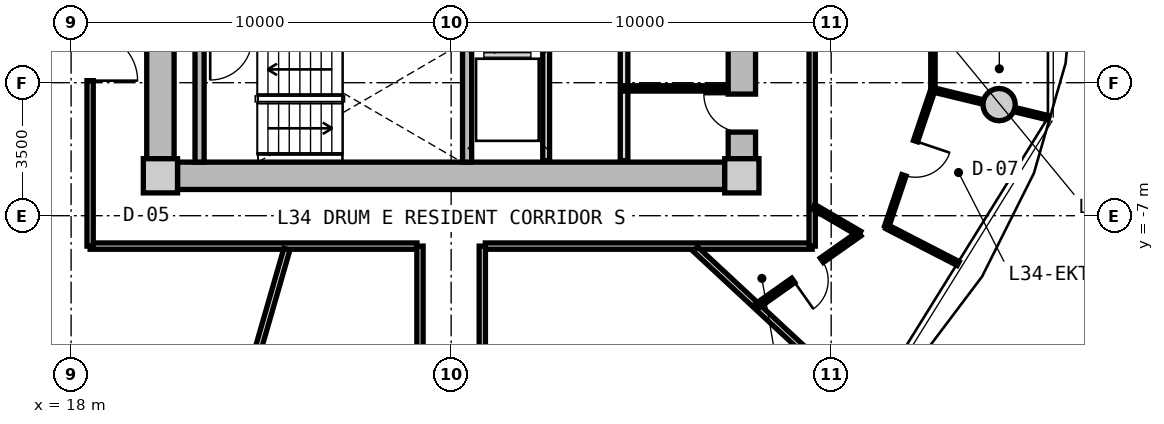
"""IFC4 building model, lengths in metres.
Left out: names, types, materials, properties, quantities, classifications, styles, units other than length and angle.
Written with IfcOpenShell. Run it as: python <this file> out.ifc"""

import sys

from ifc_helpers import new_model, si_unit, direction, frame, frame_2d, origin, origin_2d, place, context, subcontext, project, spatial, rectangle, circle, extrude, source, transform, mapped, element, fill, save


model = new_model("IFC4")
c1 = context("Model", 3, precision=1e-05, world=origin(), true_north=direction((0.0, 1.0)))
c2 = subcontext(c1, "Body", "Model", "MODEL_VIEW")
j1 = project(units=[si_unit("LENGTHUNIT", "METRE"), si_unit("PLANEANGLEUNIT", "RADIAN")], contexts=[c1])
p1 = place(None, origin())
s1 = spatial("IfcSite", under=j1, at=p1, CompositionType="ELEMENT")
p2 = place(p1, origin())
s2 = spatial("IfcBuilding", under=s1, at=p2, CompositionType="ELEMENT")
p3 = place(p2, frame((0.0, 0.0, 111.5)))
s3 = spatial("IfcBuildingStorey", under=s2, at=p3, CompositionType="ELEMENT", Elevation=111.5)
m1 = source(origin(), c2, "Body", "SweptSolid", [
    extrude(rectangle(XDim=0.9, YDim=0.9, at=origin_2d()), origin(), (0.0, 0.0, 1.0), 3.05),
])
for number, where, z_axis, x_axis in (
    (1, (20.35, -5.95, 0.0), (0.0, 0.0, 1.0), (1.0, 0.0, 0.0)),
    (2, (35.65, -5.95, 0.0), (0.0, 0.0, 1.0), (1.0, 0.0, 0.0)),
):
    element("IfcColumn", number, at=place(p3, frame(where, z_axis=z_axis, x_axis=x_axis)), inside=s3, PredefinedType="COLUMN", context=c2, shape_type="MappedRepresentation", body=[
        mapped(m1, transform((0.0, 0.0, 0.0), x_axis=(1.0, 0.0, 0.0), y_axis=(0.0, 1.0, 0.0), z_axis=(0.0, 0.0, 1.0), scale=1.0)),
    ])
m2 = source(origin(), c2, "Body", "SweptSolid", [
    extrude(rectangle(XDim=14.4, YDim=0.72, at=frame_2d((7.2, 0.0))), origin(), (0.0, 0.0, 1.0), 2.79),
])
p4 = place(p3, frame((35.2, -5.95, 0.0), z_axis=(0.0, 0.0, 1.0), x_axis=(-1.0, 0.0, 0.0)))
e3 = element("IfcWall", 3, at=p4, inside=s3, PredefinedType="SHEAR", context=c2, shape_type="MappedRepresentation", body=[
    mapped(m2, transform((0.0, 0.0, 0.0), x_axis=(1.0, 0.0, 0.0), y_axis=(0.0, 1.0, 0.0), z_axis=(0.0, 0.0, 1.0), scale=1.0)),
])
m3 = source(origin(), c2, "Body", "SweptSolid", [
    extrude(rectangle(XDim=11.0, YDim=0.72, at=frame_2d((5.5, 0.0))), origin(), (0.0, 0.0, 1.0), 2.79),
])
p5 = place(p3, frame((20.35, -5.5, 0.0), z_axis=(0.0, 0.0, 1.0), x_axis=(0.0, 1.0, 0.0)))
e4 = element("IfcWall", 4, at=p5, inside=s3, PredefinedType="SHEAR", context=c2, shape_type="MappedRepresentation", body=[
    mapped(m3, transform((0.0, 0.0, 0.0), x_axis=(1.0, 0.0, 0.0), y_axis=(0.0, 1.0, 0.0), z_axis=(0.0, 0.0, 1.0), scale=1.0)),
])
p6 = place(p5, frame((3.8, 0.0, 0.0)))
e5 = element("IfcOpeningElement", 5, at=p6, cuts=e4, PredefinedType="OPENING", context=c2, shape_type="SweptSolid", body=[
    extrude(rectangle(XDim=1.2, YDim=2.15, at=frame_2d((0.6, 1.075))), frame((0.0, 0.37, 0.0), z_axis=(0.0, -1.0, 0.0), x_axis=(1.0, 0.0, 0.0)), (0.0, 0.0, 1.0), 0.74),
])
p7 = place(p3, frame((35.65, 5.5, 0.0), z_axis=(0.0, 0.0, 1.0), x_axis=(0.0, -1.0, 0.0)))
e6 = element("IfcWall", 6, at=p7, inside=s3, PredefinedType="SHEAR", context=c2, shape_type="MappedRepresentation", body=[
    mapped(m3, transform((0.0, 0.0, 0.0), x_axis=(1.0, 0.0, 0.0), y_axis=(0.0, 1.0, 0.0), z_axis=(0.0, 0.0, 1.0), scale=1.0)),
])
p8 = place(p7, frame((5.65, 0.0, 0.0)))
e7 = element("IfcOpeningElement", 7, at=p8, cuts=e6, PredefinedType="OPENING", context=c2, shape_type="SweptSolid", body=[
    extrude(rectangle(XDim=1.2, YDim=2.15, at=frame_2d((0.6, 1.075))), frame((0.0, 0.37, 0.0), z_axis=(0.0, -1.0, 0.0), x_axis=(1.0, 0.0, 0.0)), (0.0, 0.0, 1.0), 0.74),
])
p9 = place(p7, frame((9.3, 0.0, 0.0)))
e8 = element("IfcOpeningElement", 8, at=p9, cuts=e6, PredefinedType="OPENING", context=c2, shape_type="SweptSolid", body=[
    extrude(rectangle(XDim=1.0, YDim=2.1, at=frame_2d((0.5, 1.05))), frame((0.0, 0.37, 0.0), z_axis=(0.0, -1.0, 0.0), x_axis=(1.0, 0.0, 0.0)), (0.0, 0.0, 1.0), 0.74),
])
m4 = source(origin(), c2, "Body", "SweptSolid", [
    extrude(circle(Radius=0.425, at=origin_2d()), origin(), (0.0, 0.0, 1.0), 3.05),
])
p10 = place(p3, frame((42.419, -4.076, 0.0), z_axis=(0.0, 0.0, 1.0), x_axis=(1.0, 0.0, 0.0)))
e9 = element("IfcColumn", 9, at=p10, inside=s3, PredefinedType="COLUMN", context=c2, shape_type="MappedRepresentation", body=[
    mapped(m4, transform((0.0, 0.0, 0.0), x_axis=(1.0, 0.0, 0.0), y_axis=(0.0, 1.0, 0.0), z_axis=(0.0, 0.0, 1.0), scale=1.0)),
])
m5 = source(origin(), c2, "Body", "SweptSolid", [
    extrude(rectangle(XDim=3.14, YDim=0.24, at=frame_2d((1.57, 0.0))), origin(), (0.0, 0.0, 1.0), 2.79),
])
for number, where, z_axis, x_axis in (
    (10, (21.38, -5.59, 0.0), (0.0, 0.0, 1.0), (0.0, 1.0, 0.0)),
    (11, (28.42, -5.59, 0.0), (0.0, 0.0, 1.0), (0.0, 1.0, 0.0)),
):
    element("IfcWall", number, at=place(p3, frame(where, z_axis=z_axis, x_axis=x_axis)), inside=s3, PredefinedType="PARTITIONING", context=c2, shape_type="MappedRepresentation", body=[
        mapped(m5, transform((0.0, 0.0, 0.0), x_axis=(1.0, 0.0, 0.0), y_axis=(0.0, 1.0, 0.0), z_axis=(0.0, 0.0, 1.0), scale=1.0)),
    ])
m6 = source(origin(), c2, "Body", "SweptSolid", [
    extrude(rectangle(XDim=3.8, YDim=0.2, at=frame_2d((1.9, 0.0))), origin(), (0.0, 0.0, 1.0), 2.775),
])
p11 = place(p3, frame((32.55, -5.55, 0.0), z_axis=(0.0, 0.0, 1.0), x_axis=(0.0, 1.0, 0.0)))
e12 = element("IfcWall", 12, at=p11, inside=s3, PredefinedType="PARTITIONING", context=c2, shape_type="MappedRepresentation", body=[
    mapped(m6, transform((0.0, 0.0, 0.0), x_axis=(1.0, 0.0, 0.0), y_axis=(0.0, 1.0, 0.0), z_axis=(0.0, 0.0, 1.0), scale=1.0)),
])
m7 = source(origin(), c2, "Body", "SweptSolid", [
    extrude(rectangle(XDim=3.22, YDim=0.18, at=frame_2d((1.61, 0.0))), origin(), (0.0, 0.0, 1.0), 2.775),
])
p12 = place(p3, frame((30.5, -5.55, 0.0), z_axis=(0.0, 0.0, 1.0), x_axis=(0.0, 1.0, 0.0)))
e13 = element("IfcWall", 13, at=p12, inside=s3, PredefinedType="PARTITIONING", context=c2, shape_type="MappedRepresentation", body=[
    mapped(m7, transform((0.0, 0.0, 0.0), x_axis=(1.0, 0.0, 0.0), y_axis=(0.0, 1.0, 0.0), z_axis=(0.0, 0.0, 1.0), scale=1.0)),
])
m8 = source(origin(), c2, "Body", "SweptSolid", [
    extrude(rectangle(XDim=2.7, YDim=0.14, at=frame_2d((1.35, 0.0))), origin(), (0.0, 0.0, 1.0), 2.775),
])
p13 = place(p3, frame((32.55, -3.65, 0.0), z_axis=(0.0, 0.0, 1.0), x_axis=(1.0, 0.0, 0.0)))
e14 = element("IfcWall", 14, at=p13, inside=s3, PredefinedType="PARTITIONING", context=c2, shape_type="MappedRepresentation", body=[
    mapped(m8, transform((0.0, 0.0, 0.0), x_axis=(1.0, 0.0, 0.0), y_axis=(0.0, 1.0, 0.0), z_axis=(0.0, 0.0, 1.0), scale=1.0)),
])
m9 = source(origin(), c2, "Body", "SweptSolid", [
    extrude(rectangle(XDim=8.6, YDim=0.165, at=frame_2d((4.3, 0.0))), origin(), (0.0, 0.0, 1.0), 2.775),
])
for number, where, z_axis, x_axis in (
    (15, (37.5, -7.8, 0.0), (0.0, 0.0, 1.0), (-1.0, 0.0, 0.0)),
    (16, (27.1, -7.8, 0.0), (0.0, 0.0, 1.0), (-1.0, 0.0, 0.0)),
):
    element("IfcWall", number, at=place(p3, frame(where, z_axis=z_axis, x_axis=x_axis)), inside=s3, PredefinedType="PARTITIONING", context=c2, shape_type="MappedRepresentation", body=[
        mapped(m9, transform((0.0, 0.0, 0.0), x_axis=(1.0, 0.0, 0.0), y_axis=(0.0, 1.0, 0.0), z_axis=(0.0, 0.0, 1.0), scale=1.0)),
    ])
m10 = source(origin(), c2, "Body", "SweptSolid", [
    extrude(rectangle(XDim=15.6, YDim=0.165, at=frame_2d((7.8, 0.0))), origin(), (0.0, 0.0, 1.0), 2.775),
])
p14 = place(p3, frame((18.5, -7.8, 0.0), z_axis=(0.0, 0.0, 1.0), x_axis=(0.0, 1.0, 0.0)))
e17 = element("IfcWall", 17, at=p14, inside=s3, PredefinedType="PARTITIONING", context=c2, shape_type="MappedRepresentation", body=[
    mapped(m10, transform((0.0, 0.0, 0.0), x_axis=(1.0, 0.0, 0.0), y_axis=(0.0, 1.0, 0.0), z_axis=(0.0, 0.0, 1.0), scale=1.0)),
])
p15 = place(p14, frame((10.383, 0.0, 0.0)))
e18 = element("IfcOpeningElement", 18, at=p15, cuts=e17, PredefinedType="OPENING", context=c2, shape_type="SweptSolid", body=[
    extrude(rectangle(XDim=1.05, YDim=2.15, at=frame_2d((0.525, 1.075))), frame((0.0, 0.093, 0.0), z_axis=(0.0, -1.0, 0.0), x_axis=(1.0, 0.0, 0.0)), (0.0, 0.0, 1.0), 0.185),
])
p16 = place(p14, frame((4.353, 0.0, 0.0)))
e19 = element("IfcOpeningElement", 19, at=p16, cuts=e17, PredefinedType="OPENING", context=c2, shape_type="SweptSolid", body=[
    extrude(rectangle(XDim=1.25, YDim=2.2, at=frame_2d((0.625, 1.1))), frame((0.0, 0.093, 0.0), z_axis=(0.0, -1.0, 0.0), x_axis=(1.0, 0.0, 0.0)), (0.0, 0.0, 1.0), 0.185),
])
p17 = place(p3, frame((37.5, 7.8, 0.0), z_axis=(0.0, 0.0, 1.0), x_axis=(0.0, -1.0, 0.0)))
e20 = element("IfcWall", 20, at=p17, inside=s3, PredefinedType="PARTITIONING", context=c2, shape_type="MappedRepresentation", body=[
    mapped(m10, transform((0.0, 0.0, 0.0), x_axis=(1.0, 0.0, 0.0), y_axis=(0.0, 1.0, 0.0), z_axis=(0.0, 0.0, 1.0), scale=1.0)),
])
p18 = place(p17, frame((6.87, 0.0, 0.0)))
e21 = element("IfcOpeningElement", 21, at=p18, cuts=e20, PredefinedType="OPENING", context=c2, shape_type="SweptSolid", body=[
    extrude(rectangle(XDim=1.05, YDim=2.15, at=frame_2d((0.525, 1.075))), frame((0.0, 0.093, 0.0), z_axis=(0.0, -1.0, 0.0), x_axis=(1.0, 0.0, 0.0)), (0.0, 0.0, 1.0), 0.185),
])
m11 = source(origin(), c2, "Body", "SweptSolid", [
    extrude(rectangle(XDim=8.989, YDim=0.165, at=frame_2d((4.495, 0.0))), origin(), (0.0, 0.0, 1.0), 2.275),
])
p19 = place(p3, frame((23.678, -7.88, 0.0), z_axis=(0.0, 0.0, 1.0), x_axis=(-0.27702323008, -0.960863221274, 0.0)))
e22 = element("IfcWall", 22, at=p19, inside=s3, PredefinedType="PARTITIONING", context=c2, shape_type="MappedRepresentation", body=[
    mapped(m11, transform((0.0, 0.0, 0.0), x_axis=(1.0, 0.0, 0.0), y_axis=(0.0, 1.0, 0.0), z_axis=(0.0, 0.0, 1.0), scale=1.0)),
])
m12 = source(origin(), c2, "Body", "SweptSolid", [
    extrude(rectangle(XDim=6.187, YDim=0.165, at=frame_2d((3.093, 0.0))), origin(), (0.0, 0.0, 1.0), 2.275),
])
p20 = place(p3, frame((34.429, -7.88, 0.0), z_axis=(0.0, 0.0, 1.0), x_axis=(0.732501077882, -0.680765870841, 0.0)))
e23 = element("IfcWall", 23, at=p20, inside=s3, PredefinedType="PARTITIONING", context=c2, shape_type="MappedRepresentation", body=[
    mapped(m12, transform((0.0, 0.0, 0.0), x_axis=(1.0, 0.0, 0.0), y_axis=(0.0, 1.0, 0.0), z_axis=(0.0, 0.0, 1.0), scale=1.0)),
])
m13 = source(origin(), c2, "Body", "SweptSolid", [
    extrude(rectangle(XDim=7.56, YDim=0.165, at=frame_2d((3.78, 0.0))), origin(), (0.0, 0.0, 1.0), 2.775),
])
p21 = place(p3, frame((27.18, -15.36, 0.0), z_axis=(0.0, 0.0, 1.0), x_axis=(0.0, 1.0, 0.0)))
e24 = element("IfcWall", 24, at=p21, inside=s3, PredefinedType="PARTITIONING", context=c2, shape_type="MappedRepresentation", body=[
    mapped(m13, transform((0.0, 0.0, 0.0), x_axis=(1.0, 0.0, 0.0), y_axis=(0.0, 1.0, 0.0), z_axis=(0.0, 0.0, 1.0), scale=1.0)),
])
p22 = place(p21, frame((3.255, 0.0, 0.0)))
e25 = element("IfcOpeningElement", 25, at=p22, cuts=e24, PredefinedType="OPENING", context=c2, shape_type="SweptSolid", body=[
    extrude(rectangle(XDim=1.05, YDim=2.15, at=frame_2d((0.525, 1.075))), frame((0.0, 0.093, 0.0), z_axis=(0.0, -1.0, 0.0), x_axis=(1.0, 0.0, 0.0)), (0.0, 0.0, 1.0), 0.185),
])
p23 = place(p3, frame((28.82, -15.36, 0.0), z_axis=(0.0, 0.0, 1.0), x_axis=(0.0, 1.0, 0.0)))
e26 = element("IfcWall", 26, at=p23, inside=s3, PredefinedType="PARTITIONING", context=c2, shape_type="MappedRepresentation", body=[
    mapped(m13, transform((0.0, 0.0, 0.0), x_axis=(1.0, 0.0, 0.0), y_axis=(0.0, 1.0, 0.0), z_axis=(0.0, 0.0, 1.0), scale=1.0)),
])
p24 = place(p23, frame((3.255, 0.0, 0.0)))
e27 = element("IfcOpeningElement", 27, at=p24, cuts=e26, PredefinedType="OPENING", context=c2, shape_type="SweptSolid", body=[
    extrude(rectangle(XDim=1.05, YDim=2.15, at=frame_2d((0.525, 1.075))), frame((0.0, 0.093, 0.0), z_axis=(0.0, -1.0, 0.0), x_axis=(1.0, 0.0, 0.0)), (0.0, 0.0, 1.0), 0.185),
])
m14 = source(origin(), c2, "Body", "SweptSolid", [
    extrude(rectangle(XDim=7.375, YDim=0.115, at=frame_2d((3.688, 0.0))), origin(), (0.0, 0.0, 1.0), 2.775),
])
p25 = place(p3, frame((40.678, -3.688, 0.0), z_axis=(0.0, 0.0, 1.0), x_axis=(0.0, 1.0, 0.0)))
e28 = element("IfcWall", 28, at=p25, inside=s3, PredefinedType="PARTITIONING", context=c2, shape_type="MappedRepresentation", body=[
    mapped(m14, transform((0.0, 0.0, 0.0), x_axis=(1.0, 0.0, 0.0), y_axis=(0.0, 1.0, 0.0), z_axis=(0.0, 0.0, 1.0), scale=1.0)),
])
p26 = place(p25, frame((3.213, 0.0, 0.0)))
e29 = element("IfcOpeningElement", 29, at=p26, cuts=e28, PredefinedType="OPENING", context=c2, shape_type="SweptSolid", body=[
    extrude(rectangle(XDim=0.95, YDim=2.1, at=frame_2d((0.475, 1.05))), frame((0.0, 0.067, 0.0), z_axis=(0.0, -1.0, 0.0), x_axis=(1.0, 0.0, 0.0)), (0.0, 0.0, 1.0), 0.135),
])
m15 = source(origin(), c2, "Body", "SweptSolid", [
    extrude(rectangle(XDim=3.133, YDim=0.115, at=frame_2d((1.567, 0.0))), origin(), (0.0, 0.0, 1.0), 2.275),
])
p27 = place(p3, frame((40.678, -3.688, 0.0), z_axis=(0.0, 0.0, 1.0), x_axis=(0.971863619682, -0.235544273414, 0.0)))
e30 = element("IfcWall", 30, at=p27, inside=s3, PredefinedType="PARTITIONING", context=c2, shape_type="MappedRepresentation", body=[
    mapped(m15, transform((0.0, 0.0, 0.0), x_axis=(1.0, 0.0, 0.0), y_axis=(0.0, 1.0, 0.0), z_axis=(0.0, 0.0, 1.0), scale=1.0)),
])
m16 = source(origin(), c2, "Body", "SweptSolid", [
    extrude(rectangle(XDim=1.407, YDim=0.14, at=frame_2d((0.704, 0.0))), origin(), (0.0, 0.0, 1.0), 2.775),
])
p28 = place(p3, frame((37.53, -6.762, 0.0), z_axis=(0.0, 0.0, 1.0), x_axis=(0.863539718977, -0.504280828258, 0.0)))
e31 = element("IfcWall", 31, at=p28, inside=s3, PredefinedType="PARTITIONING", context=c2, shape_type="MappedRepresentation", body=[
    mapped(m16, transform((0.0, 0.0, 0.0), x_axis=(1.0, 0.0, 0.0), y_axis=(0.0, 1.0, 0.0), z_axis=(0.0, 0.0, 1.0), scale=1.0)),
])
m17 = source(origin(), c2, "Body", "SweptSolid", [
    extrude(rectangle(XDim=3.347, YDim=0.14, at=frame_2d((1.673, 0.0))), origin(), (0.0, 0.0, 1.0), 2.775),
])
p29 = place(p3, frame((38.745, -7.472, 0.0), z_axis=(0.0, 0.0, 1.0), x_axis=(-0.81705680263, -0.576557179537, 0.0)))
e32 = element("IfcWall", 32, at=p29, inside=s3, PredefinedType="PARTITIONING", context=c2, shape_type="MappedRepresentation", body=[
    mapped(m17, transform((0.0, 0.0, 0.0), x_axis=(1.0, 0.0, 0.0), y_axis=(0.0, 1.0, 0.0), z_axis=(0.0, 0.0, 1.0), scale=1.0)),
])
p30 = place(p29, frame((1.214, 0.0, 0.0)))
e33 = element("IfcOpeningElement", 33, at=p30, cuts=e32, PredefinedType="OPENING", context=c2, shape_type="SweptSolid", body=[
    extrude(rectangle(XDim=0.92, YDim=2.1, at=frame_2d((0.46, 1.05))), frame((0.0, 0.08, 0.0), z_axis=(0.0, -1.0, 0.0), x_axis=(1.0, 0.0, 0.0)), (0.0, 0.0, 1.0), 0.16),
])
m18 = source(origin(), c2, "Body", "SweptSolid", [
    extrude(rectangle(XDim=2.117, YDim=0.115, at=frame_2d((1.059, 0.0))), origin(), (0.0, 0.0, 1.0), 2.775),
])
p31 = place(p3, frame((39.46, -7.289, 0.0), z_axis=(0.0, 0.0, 1.0), x_axis=(0.888941834945, -0.45802010227, 0.0)))
e34 = element("IfcWall", 34, at=p31, inside=s3, PredefinedType="PARTITIONING", context=c2, shape_type="MappedRepresentation", body=[
    mapped(m18, transform((0.0, 0.0, 0.0), x_axis=(1.0, 0.0, 0.0), y_axis=(0.0, 1.0, 0.0), z_axis=(0.0, 0.0, 1.0), scale=1.0)),
])
m19 = source(origin(), c2, "Body", "SweptSolid", [
    extrude(rectangle(XDim=3.801, YDim=0.115, at=frame_2d((1.901, 0.0))), origin(), (0.0, 0.0, 1.0), 2.775),
])
p32 = place(p3, frame((39.46, -7.289, 0.0), z_axis=(0.0, 0.0, 1.0), x_axis=(0.320097904666, 0.947384468644, 0.0)))
e35 = element("IfcWall", 35, at=p32, inside=s3, PredefinedType="PARTITIONING", context=c2, shape_type="MappedRepresentation", body=[
    mapped(m19, transform((0.0, 0.0, 0.0), x_axis=(1.0, 0.0, 0.0), y_axis=(0.0, 1.0, 0.0), z_axis=(0.0, 0.0, 1.0), scale=1.0)),
])
p33 = place(p32, frame((1.426, 0.0, 0.0)))
e36 = element("IfcOpeningElement", 36, at=p33, cuts=e35, PredefinedType="OPENING", context=c2, shape_type="SweptSolid", body=[
    extrude(rectangle(XDim=0.95, YDim=2.1, at=frame_2d((0.475, 1.05))), frame((0.0, 0.067, 0.0), z_axis=(0.0, -1.0, 0.0), x_axis=(1.0, 0.0, 0.0)), (0.0, 0.0, 1.0), 0.135),
])
m20 = source(origin(), c2, "Body", "SweptSolid", [
    extrude(rectangle(XDim=1.0, YDim=2.1, at=frame_2d((0.5, 1.05))), frame((0.0, 0.025, 0.0), z_axis=(0.0, -1.0, 0.0), x_axis=(1.0, 0.0, 0.0)), (0.0, 0.0, 1.0), 0.05),
])
p34 = place(p9, frame((1.0, 0.0, 0.0), z_axis=(0.0, 0.0, 1.0), x_axis=(-1.0, 0.0, 0.0)))
e37 = element("IfcDoor", 37, at=p34, inside=s3, OperationType="SINGLE_SWING_RIGHT", PredefinedType="DOOR", context=c2, shape_type="MappedRepresentation", body=[
    mapped(m20, transform((0.0, 0.0, 0.0), x_axis=(1.0, 0.0, 0.0), y_axis=(0.0, 1.0, 0.0), z_axis=(0.0, 0.0, 1.0), scale=1.0)),
])
fill(e8, e37)
m21 = source(origin(), c2, "Body", "SweptSolid", [
    extrude(rectangle(XDim=1.25, YDim=2.2, at=frame_2d((0.625, 1.1))), frame((0.0, 0.025, 0.0), z_axis=(0.0, -1.0, 0.0), x_axis=(1.0, 0.0, 0.0)), (0.0, 0.0, 1.0), 0.05),
])
p35 = place(p16, frame((1.25, 0.0, 0.0), z_axis=(0.0, 0.0, 1.0), x_axis=(-1.0, 0.0, 0.0)))
e38 = element("IfcDoor", 38, at=p35, inside=s3, OperationType="SINGLE_SWING_RIGHT", PredefinedType="DOOR", context=c2, shape_type="MappedRepresentation", body=[
    mapped(m21, transform((0.0, 0.0, 0.0), x_axis=(1.0, 0.0, 0.0), y_axis=(0.0, 1.0, 0.0), z_axis=(0.0, 0.0, 1.0), scale=1.0)),
])
fill(e19, e38)
m22 = source(origin(), c2, "Body", "SweptSolid", [
    extrude(rectangle(XDim=0.92, YDim=2.1, at=frame_2d((0.46, 1.05))), frame((0.0, 0.025, 0.0), z_axis=(0.0, -1.0, 0.0), x_axis=(1.0, 0.0, 0.0)), (0.0, 0.0, 1.0), 0.05),
])
p36 = place(p30, origin())
e39 = element("IfcDoor", 39, at=p36, inside=s3, OperationType="SINGLE_SWING_RIGHT", PredefinedType="DOOR", context=c2, shape_type="MappedRepresentation", body=[
    mapped(m22, transform((0.0, 0.0, 0.0), x_axis=(1.0, 0.0, 0.0), y_axis=(0.0, 1.0, 0.0), z_axis=(0.0, 0.0, 1.0), scale=1.0)),
])
fill(e33, e39)
m23 = source(origin(), c2, "Body", "SweptSolid", [
    extrude(rectangle(XDim=0.95, YDim=2.1, at=frame_2d((0.475, 1.05))), frame((0.0, 0.025, 0.0), z_axis=(0.0, -1.0, 0.0), x_axis=(1.0, 0.0, 0.0)), (0.0, 0.0, 1.0), 0.05),
])
p37 = place(p33, frame((0.95, 0.0, 0.0), z_axis=(0.0, 0.0, 1.0), x_axis=(-1.0, 0.0, 0.0)))
e40 = element("IfcDoor", 40, at=p37, inside=s3, OperationType="SINGLE_SWING_LEFT", PredefinedType="DOOR", context=c2, shape_type="MappedRepresentation", body=[
    mapped(m23, transform((0.0, 0.0, 0.0), x_axis=(1.0, 0.0, 0.0), y_axis=(0.0, 1.0, 0.0), z_axis=(0.0, 0.0, 1.0), scale=1.0)),
])
fill(e36, e40)
save(model, sys.argv[1])
